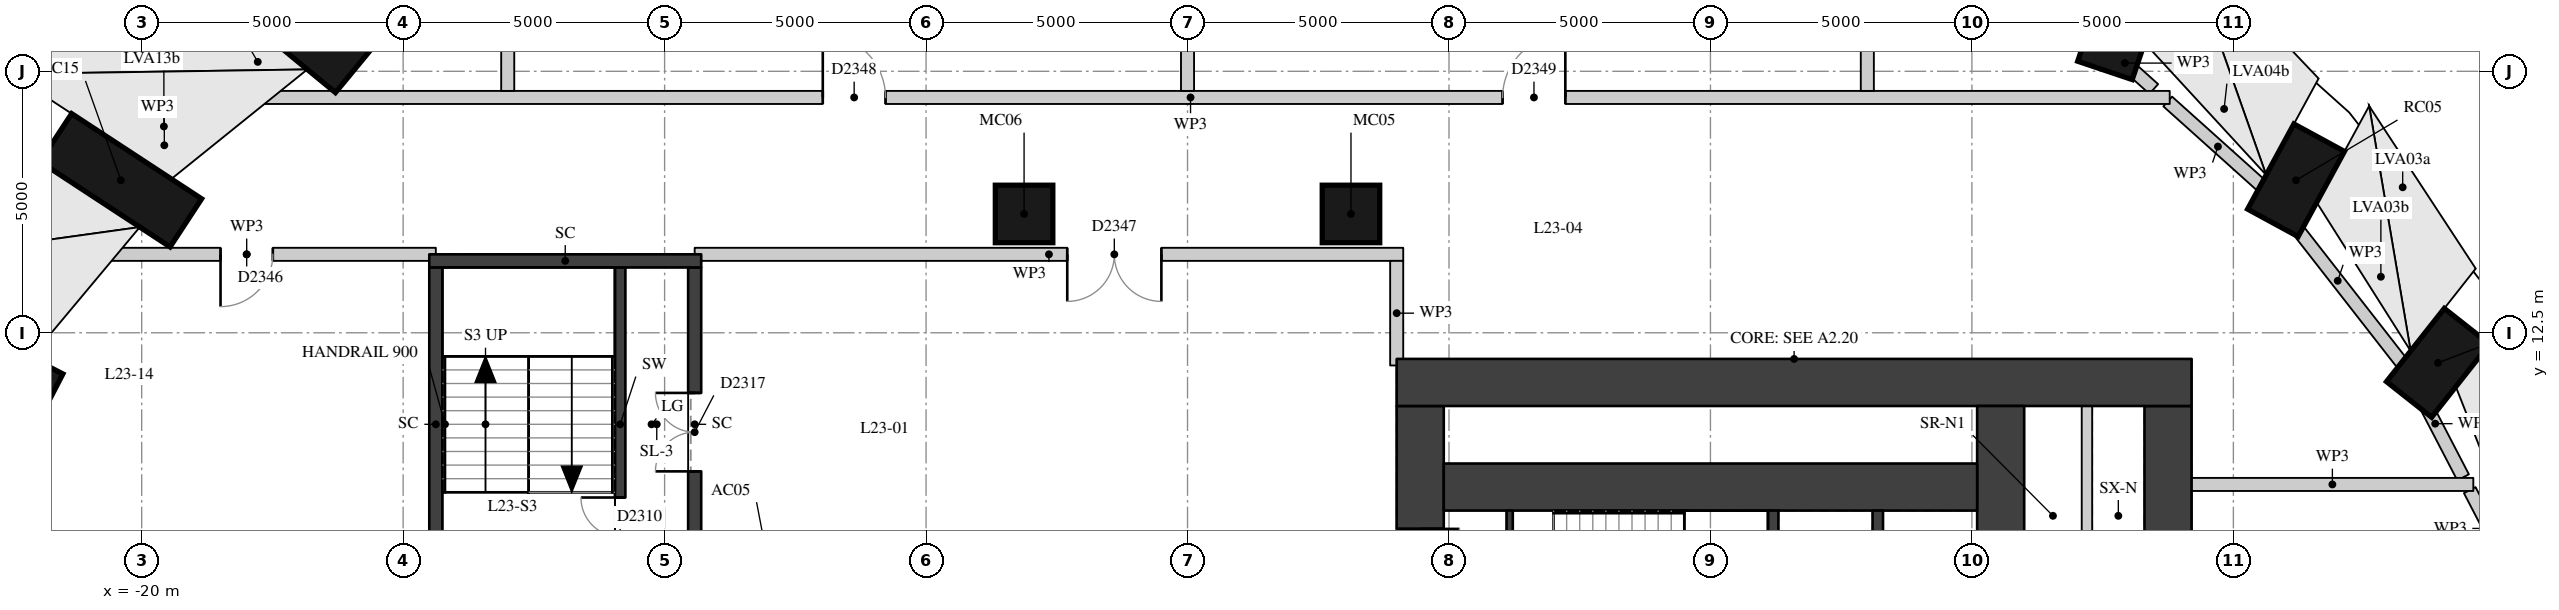
"""IFC4 building model, lengths in metres.
Left out: names, types, materials, properties, quantities, classifications, styles, units other than length and angle.
Written with IfcOpenShell. Run it as: python <this file> out.ifc"""

import sys

from ifc_helpers import new_model, si_unit, direction, frame, frame_2d, origin, origin_2d, place, context, subcontext, project, spatial, rectangle, extrude, element, fill, save


model = new_model("IFC4")
c1 = context("Model", 3, precision=1e-05, world=origin(), true_north=direction((0.0, 1.0)))
c2 = subcontext(c1, "Body", "Model", "MODEL_VIEW")
j1 = project(units=[si_unit("LENGTHUNIT", "METRE"), si_unit("PLANEANGLEUNIT", "RADIAN")], contexts=[c1])
p1 = place(None, origin())
s1 = spatial("IfcSite", under=j1, at=p1, CompositionType="ELEMENT")
p2 = place(p1, origin())
s2 = spatial("IfcBuilding", under=s1, at=p2, CompositionType="ELEMENT")
p3 = place(p2, frame((0.0, 0.0, 84.4)))
s3 = spatial("IfcBuildingStorey", under=s2, at=p3, CompositionType="ELEMENT", Elevation=84.4)
p4 = place(p3, frame((26.546, 8.636, 0.301), z_axis=(-0.297784822082, -0.269560947595, 0.91578441528), x_axis=(0.67893196225, 0.614583180623, 0.401670144186)))
e1 = element("IfcColumn", 1, at=p4, inside=s3, PredefinedType="COLUMN", context=c2, shape_type="SweptSolid", body=[
    extrude(rectangle(XDim=1.5, YDim=1.1, at=origin_2d()), origin(), (0.0, 0.0, 1.0), 4.256),
])
p5 = place(p3, frame((24.465, 12.625, 0.314), z_axis=(-0.259292563916, -0.328353260047, 0.90826840907), x_axis=(0.562892002032, 0.712814209288, 0.418387974356)))
e2 = element("IfcColumn", 2, at=p5, inside=s3, PredefinedType="COLUMN", context=c2, shape_type="SweptSolid", body=[
    extrude(rectangle(XDim=1.5, YDim=1.1, at=origin_2d()), origin(), (0.0, 0.0, 1.0), 4.263),
])
p6 = place(p3, frame((21.641, 16.23, 0.325), z_axis=(-0.207259742334, -0.381147637542, 0.900982728804), x_axis=(0.430414464234, 0.79152591024, 0.433854955482)))
e3 = element("IfcColumn", 3, at=p6, inside=s3, PredefinedType="COLUMN", context=c2, shape_type="SweptSolid", body=[
    extrude(rectangle(XDim=1.5, YDim=1.1, at=origin_2d()), origin(), (0.0, 0.0, 1.0), 4.272),
])
p7 = place(p3, frame((18.159, 19.343, 0.337), z_axis=(-0.143360529219, -0.426262440358, 0.893167448244), x_axis=(0.28471881473, 0.846571489681, 0.449724259294)))
e4 = element("IfcColumn", 4, at=p7, inside=s3, PredefinedType="COLUMN", context=c2, shape_type="SweptSolid", body=[
    extrude(rectangle(XDim=1.5, YDim=1.1, at=origin_2d()), origin(), (0.0, 0.0, 1.0), 4.283),
])
p8 = place(p3, frame((-18.159, 19.343, 0.471), z_axis=(0.48434493808, -0.399374952802, 0.778401970726), x_axis=(-0.600566052476, 0.49520707249, 0.627766176191)))
e5 = element("IfcColumn", 5, at=p8, inside=s3, PredefinedType="COLUMN", context=c2, shape_type="SweptSolid", body=[
    extrude(rectangle(XDim=1.5, YDim=1.1, at=origin_2d()), origin(), (0.0, 0.0, 1.0), 4.571),
])
p9 = place(p3, frame((-21.641, 16.23, 0.483), z_axis=(0.538208092319, -0.352637325714, 0.765492629537), x_axis=(-0.640294887233, 0.419525235545, 0.64344466283)))
e6 = element("IfcColumn", 6, at=p9, inside=s3, PredefinedType="COLUMN", context=c2, shape_type="SweptSolid", body=[
    extrude(rectangle(XDim=1.5, YDim=1.1, at=origin_2d()), origin(), (0.0, 0.0, 1.0), 4.618),
])
p10 = place(p3, frame((-24.465, 12.625, 0.491), z_axis=(0.581326092093, -0.300814349974, 0.75602295038), x_axis=(-0.671452374876, 0.347451305617, 0.65454510807)))
e7 = element("IfcColumn", 7, at=p10, inside=s3, PredefinedType="COLUMN", context=c2, shape_type="SweptSolid", body=[
    extrude(rectangle(XDim=1.5, YDim=1.1, at=origin_2d()), origin(), (0.0, 0.0, 1.0), 4.654),
])
for number, where, z_axis, x_axis in (
    (8, (3.126, 14.772, 0.0), (0.0, 0.0, 1.0), (1.0, 0.0, 0.0)),
    (9, (-3.126, 14.772, 0.0), (0.0, 0.0, 1.0), (1.0, 0.0, 0.0)),
):
    element("IfcColumn", number, at=place(p3, frame(where, z_axis=z_axis, x_axis=x_axis)), inside=s3, PredefinedType="COLUMN", context=c2, shape_type="SweptSolid", body=[
        extrude(rectangle(XDim=1.1, YDim=1.1, at=origin_2d()), origin(), (0.0, 0.0, 1.0), 4.5),
    ])
p11 = place(p3, frame((4.45, -11.1, 0.0), z_axis=(0.0, 0.0, 1.0), x_axis=(0.0, 1.0, 0.0)))
e10 = element("IfcWall", 10, at=p11, inside=s3, PredefinedType="SHEAR", context=c2, shape_type="SweptSolid", body=[
    extrude(rectangle(XDim=22.2, YDim=0.9, at=frame_2d((11.1, 0.0))), origin(), (0.0, 0.0, 1.0), 4.22),
])
p12 = place(p11, frame((2.35, 0.0, 0.0)))
e11 = element("IfcOpeningElement", 11, at=p12, cuts=e10, PredefinedType="OPENING", context=c2, shape_type="SweptSolid", body=[
    extrude(rectangle(XDim=1.5, YDim=2.1, at=frame_2d((0.75, 1.05))), frame((0.0, 0.46, 0.0), z_axis=(0.0, -1.0, 0.0), x_axis=(1.0, 0.0, 0.0)), (0.0, 0.0, 1.0), 0.92),
])
p13 = place(p11, frame((5.45, 0.0, 0.0)))
e12 = element("IfcOpeningElement", 12, at=p13, cuts=e10, PredefinedType="OPENING", context=c2, shape_type="SweptSolid", body=[
    extrude(rectangle(XDim=1.8, YDim=2.1, at=frame_2d((0.9, 1.05))), frame((0.0, 0.46, 0.0), z_axis=(0.0, -1.0, 0.0), x_axis=(1.0, 0.0, 0.0)), (0.0, 0.0, 1.0), 0.92),
])
p14 = place(p11, frame((7.95, 0.0, 0.0)))
e13 = element("IfcOpeningElement", 13, at=p14, cuts=e10, PredefinedType="OPENING", context=c2, shape_type="SweptSolid", body=[
    extrude(rectangle(XDim=1.1, YDim=2.1, at=frame_2d((0.55, 1.05))), frame((0.0, 0.46, 0.0), z_axis=(0.0, -1.0, 0.0), x_axis=(1.0, 0.0, 0.0)), (0.0, 0.0, 1.0), 0.92),
])
p15 = place(p11, frame((10.6, 0.0, 0.0)))
e14 = element("IfcOpeningElement", 14, at=p15, cuts=e10, PredefinedType="OPENING", context=c2, shape_type="SweptSolid", body=[
    extrude(rectangle(XDim=1.0, YDim=2.1, at=frame_2d((0.5, 1.05))), frame((0.0, 0.46, 0.0), z_axis=(0.0, -1.0, 0.0), x_axis=(1.0, 0.0, 0.0)), (0.0, 0.0, 1.0), 0.92),
])
p16 = place(p11, frame((13.15, 0.0, 0.0)))
e15 = element("IfcOpeningElement", 15, at=p16, cuts=e10, PredefinedType="OPENING", context=c2, shape_type="SweptSolid", body=[
    extrude(rectangle(XDim=1.1, YDim=2.1, at=frame_2d((0.55, 1.05))), frame((0.0, 0.46, 0.0), z_axis=(0.0, -1.0, 0.0), x_axis=(1.0, 0.0, 0.0)), (0.0, 0.0, 1.0), 0.92),
])
p17 = place(p11, frame((14.95, 0.0, 0.0)))
e16 = element("IfcOpeningElement", 16, at=p17, cuts=e10, PredefinedType="OPENING", context=c2, shape_type="SweptSolid", body=[
    extrude(rectangle(XDim=1.8, YDim=2.1, at=frame_2d((0.9, 1.05))), frame((0.0, 0.46, 0.0), z_axis=(0.0, -1.0, 0.0), x_axis=(1.0, 0.0, 0.0)), (0.0, 0.0, 1.0), 0.92),
])
p18 = place(p11, frame((18.35, 0.0, 0.0)))
e17 = element("IfcOpeningElement", 17, at=p18, cuts=e10, PredefinedType="OPENING", context=c2, shape_type="SweptSolid", body=[
    extrude(rectangle(XDim=1.5, YDim=2.1, at=frame_2d((0.75, 1.05))), frame((0.0, 0.46, 0.0), z_axis=(0.0, -1.0, 0.0), x_axis=(1.0, 0.0, 0.0)), (0.0, 0.0, 1.0), 0.92),
])
p19 = place(p3, frame((18.75, -11.1, 0.0), z_axis=(0.0, 0.0, 1.0), x_axis=(0.0, 1.0, 0.0)))
e18 = element("IfcWall", 18, at=p19, inside=s3, PredefinedType="SHEAR", context=c2, shape_type="SweptSolid", body=[
    extrude(rectangle(XDim=22.2, YDim=0.9, at=frame_2d((11.1, 0.0))), origin(), (0.0, 0.0, 1.0), 4.22),
])
p20 = place(p3, frame((4.0, 11.55, 0.0), z_axis=(0.0, 0.0, 1.0), x_axis=(1.0, 0.0, 0.0)))
e19 = element("IfcWall", 19, at=p20, inside=s3, PredefinedType="SHEAR", context=c2, shape_type="SweptSolid", body=[
    extrude(rectangle(XDim=15.2, YDim=0.9, at=frame_2d((7.6, 0.0))), origin(), (0.0, 0.0, 1.0), 4.22),
])
p21 = place(p3, frame((15.55, -11.1, 0.0), z_axis=(0.0, 0.0, 1.0), x_axis=(0.0, 1.0, 0.0)))
e20 = element("IfcWall", 20, at=p21, inside=s3, PredefinedType="SHEAR", context=c2, shape_type="SweptSolid", body=[
    extrude(rectangle(XDim=22.2, YDim=0.9, at=frame_2d((11.1, 0.0))), origin(), (0.0, 0.0, 1.0), 4.22),
])
p22 = place(p21, frame((15.6, 0.0, 0.0)))
e21 = element("IfcOpeningElement", 21, at=p22, cuts=e20, PredefinedType="OPENING", context=c2, shape_type="SweptSolid", body=[
    extrude(rectangle(XDim=1.0, YDim=2.1, at=frame_2d((0.5, 1.05))), frame((0.0, 0.46, 0.0), z_axis=(0.0, -1.0, 0.0), x_axis=(1.0, 0.0, 0.0)), (0.0, 0.0, 1.0), 0.92),
])
p23 = place(p21, frame((5.6, 0.0, 0.0)))
e22 = element("IfcOpeningElement", 22, at=p23, cuts=e20, PredefinedType="OPENING", context=c2, shape_type="SweptSolid", body=[
    extrude(rectangle(XDim=1.0, YDim=2.1, at=frame_2d((0.5, 1.05))), frame((0.0, 0.46, 0.0), z_axis=(0.0, -1.0, 0.0), x_axis=(1.0, 0.0, 0.0)), (0.0, 0.0, 1.0), 0.92),
])
p24 = place(p3, frame((4.9, 9.55, 0.0), z_axis=(0.0, 0.0, 1.0), x_axis=(1.0, 0.0, 0.0)))
e23 = element("IfcWall", 23, at=p24, inside=s3, PredefinedType="SHEAR", context=c2, shape_type="SweptSolid", body=[
    extrude(rectangle(XDim=10.2, YDim=0.9, at=frame_2d((5.1, 0.0))), origin(), (0.0, 0.0, 1.0), 4.22),
])
for number, where, z_axis, x_axis in (
    (24, (11.2, 5.9, 0.0), (0.0, 0.0, 1.0), (0.0, 1.0, 0.0)),
    (25, (13.2, 5.9, 0.0), (0.0, 0.0, 1.0), (0.0, 1.0, 0.0)),
):
    element("IfcWall", number, at=place(p3, frame(where, z_axis=z_axis, x_axis=x_axis)), inside=s3, PredefinedType="SHEAR", context=c2, shape_type="SweptSolid", body=[
        extrude(rectangle(XDim=3.2, YDim=0.2, at=frame_2d((1.6, 0.0))), origin(), (0.0, 0.0, 1.0), 4.22),
    ])
p25 = place(p3, frame((6.16, 5.9, 0.0), z_axis=(0.0, 0.0, 1.0), x_axis=(0.0, 1.0, 0.0)))
e26 = element("IfcWall", 26, at=p25, inside=s3, PredefinedType="SHEAR", context=c2, shape_type="SweptSolid", body=[
    extrude(rectangle(XDim=3.2, YDim=0.12, at=frame_2d((1.6, 0.0))), origin(), (0.0, 0.0, 1.0), 4.22),
])
p26 = place(p25, frame((0.85, 0.0, 0.0)))
e27 = element("IfcOpeningElement", 27, at=p26, cuts=e26, PredefinedType="OPENING", context=c2, shape_type="SweptSolid", body=[
    extrude(rectangle(XDim=1.5, YDim=2.1, at=frame_2d((0.75, 1.05))), frame((0.0, 0.07, 0.0), z_axis=(0.0, -1.0, 0.0), x_axis=(1.0, 0.0, 0.0)), (0.0, 0.0, 1.0), 0.14),
])
p27 = place(p3, frame((-10.85, 7.75, 0.0), z_axis=(0.0, 0.0, 1.0), x_axis=(0.0, 1.0, 0.0)))
e28 = element("IfcWall", 28, at=p27, inside=s3, PredefinedType="SHEAR", context=c2, shape_type="SweptSolid", body=[
    extrude(rectangle(XDim=6.0, YDim=0.2, at=frame_2d((3.0, 0.0))), origin(), (0.0, 0.0, 1.0), 4.22),
])
p28 = place(p27, frame((0.1, 0.0, 0.0)))
e29 = element("IfcOpeningElement", 29, at=p28, cuts=e28, PredefinedType="OPENING", context=c2, shape_type="SweptSolid", body=[
    extrude(rectangle(XDim=1.5, YDim=2.1, at=frame_2d((0.75, 1.05))), frame((0.0, 0.11, 0.0), z_axis=(0.0, -1.0, 0.0), x_axis=(1.0, 0.0, 0.0)), (0.0, 0.0, 1.0), 0.22),
])
p29 = place(p3, frame((17.2, 6.9, 0.0), z_axis=(0.0, 0.0, 1.0), x_axis=(0.0, 1.0, 0.0)))
e30 = element("IfcWall", 30, at=p29, inside=s3, PredefinedType="PARTITIONING", context=c2, shape_type="SweptSolid", body=[
    extrude(rectangle(XDim=4.2, YDim=0.2, at=frame_2d((2.1, 0.0))), origin(), (0.0, 0.0, 1.0), 4.22),
])
p30 = place(p3, frame((-14.375, 7.75, -0.45), z_axis=(0.0, 0.0, 1.0), x_axis=(0.0, 1.0, 0.0)))
e31 = element("IfcWall", 31, at=p30, inside=s3, PredefinedType="SHEAR", context=c2, shape_type="SweptSolid", body=[
    extrude(rectangle(XDim=6.0, YDim=0.25, at=frame_2d((3.0, 0.0))), origin(), (0.0, 0.0, 1.0), 4.67),
])
p31 = place(p3, frame((-9.425, 7.75, -0.45), z_axis=(0.0, 0.0, 1.0), x_axis=(0.0, 1.0, 0.0)))
e32 = element("IfcWall", 32, at=p31, inside=s3, PredefinedType="SHEAR", context=c2, shape_type="SweptSolid", body=[
    extrude(rectangle(XDim=6.0, YDim=0.25, at=frame_2d((3.0, 0.0))), origin(), (0.0, 0.0, 1.0), 4.67),
])
p32 = place(p31, frame((2.1, 0.0, 0.45)))
e33 = element("IfcOpeningElement", 33, at=p32, cuts=e32, PredefinedType="OPENING", context=c2, shape_type="SweptSolid", body=[
    extrude(rectangle(XDim=1.5, YDim=2.1, at=frame_2d((0.75, 1.05))), frame((0.0, 0.135, 0.0), z_axis=(0.0, -1.0, 0.0), x_axis=(1.0, 0.0, 0.0)), (0.0, 0.0, 1.0), 0.27),
])
p33 = place(p3, frame((-14.5, 13.875, -0.45), z_axis=(0.0, 0.0, 1.0), x_axis=(1.0, 0.0, 0.0)))
e34 = element("IfcWall", 34, at=p33, inside=s3, PredefinedType="SHEAR", context=c2, shape_type="SweptSolid", body=[
    extrude(rectangle(XDim=5.2, YDim=0.25, at=frame_2d((2.6, 0.0))), origin(), (0.0, 0.0, 1.0), 4.67),
])
p34 = place(p3, frame((-18.629, 16.923, 0.0), z_axis=(0.0, 0.0, 1.0), x_axis=(-0.745977283695, -0.665971389934, 0.0)))
e35 = element("IfcWall", 35, at=p34, inside=s3, PredefinedType="PARTITIONING", context=c2, shape_type="SweptSolid", body=[
    extrude(rectangle(XDim=2.514, YDim=0.25, at=frame_2d((1.257, 0.0))), origin(), (0.0, 0.0, 1.0), 4.22),
])
p35 = place(p3, frame((20.665, 15.199, 0.0), z_axis=(0.0, 0.0, 1.0), x_axis=(-0.744342369602, 0.667798200668, 0.0)))
e36 = element("IfcWall", 36, at=p35, inside=s3, PredefinedType="PARTITIONING", context=c2, shape_type="SweptSolid", body=[
    extrude(rectangle(XDim=2.58, YDim=0.25, at=frame_2d((1.29, 0.0))), origin(), (0.0, 0.0, 1.0), 4.22),
])
p36 = place(p3, frame((23.326, 11.789, 0.0), z_axis=(0.0, 0.0, 1.0), x_axis=(-0.615213541068, 0.788360513272, 0.0)))
e37 = element("IfcWall", 37, at=p36, inside=s3, PredefinedType="PARTITIONING", context=c2, shape_type="SweptSolid", body=[
    extrude(rectangle(XDim=4.326, YDim=0.25, at=frame_2d((2.163, 0.0))), origin(), (0.0, 0.0, 1.0), 4.22),
])
p37 = place(p3, frame((24.393, 9.735, 0.0), z_axis=(0.0, 0.0, 1.0), x_axis=(-0.46104377647, 0.887377392195, 0.0)))
e38 = element("IfcWall", 38, at=p37, inside=s3, PredefinedType="PARTITIONING", context=c2, shape_type="SweptSolid", body=[
    extrude(rectangle(XDim=2.314, YDim=0.25, at=frame_2d((1.157, 0.0))), origin(), (0.0, 0.0, 1.0), 4.22),
])
p38 = place(p3, frame((-17.199, 18.198, 0.0), z_axis=(0.0, 0.0, 1.0), x_axis=(-0.746040610703, -0.665900448402, 0.0)))
e39 = element("IfcWall", 39, at=p38, inside=s3, PredefinedType="PARTITIONING", context=c2, shape_type="SweptSolid", body=[
    extrude(rectangle(XDim=1.557, YDim=0.25, at=frame_2d((0.778, 0.0))), origin(), (0.0, 0.0, 1.0), 4.22),
])
p39 = place(p3, frame((18.478, 17.161, 0.0), z_axis=(0.0, 0.0, 1.0), x_axis=(-0.744315658598, 0.667827972135, 0.0)))
e40 = element("IfcWall", 40, at=p39, inside=s3, PredefinedType="PARTITIONING", context=c2, shape_type="SweptSolid", body=[
    extrude(rectangle(XDim=1.484, YDim=0.25, at=frame_2d((0.742, 0.0))), origin(), (0.0, 0.0, 1.0), 4.22),
])
p40 = place(p3, frame((25.281, 8.027, 0.0), z_axis=(0.0, 0.0, 1.0), x_axis=(-0.461007985197, 0.88739598691, 0.0)))
e41 = element("IfcWall", 41, at=p40, inside=s3, PredefinedType="PARTITIONING", context=c2, shape_type="SweptSolid", body=[
    extrude(rectangle(XDim=1.65, YDim=0.25, at=frame_2d((0.825, 0.0))), origin(), (0.0, 0.0, 1.0), 4.22),
])
p41 = place(p3, frame((19.198, 9.6, 0.0), z_axis=(0.0, 0.0, 1.0), x_axis=(1.0, 0.0, 0.0)))
e42 = element("IfcWall", 42, at=p41, inside=s3, PredefinedType="PARTITIONING", context=c2, shape_type="SweptSolid", body=[
    extrude(rectangle(XDim=5.391, YDim=0.25, at=frame_2d((2.695, 0.0))), origin(), (0.0, 0.0, 1.0), 4.22),
])
p42 = place(p3, frame((-21.609, 14.0, 0.0), z_axis=(0.0, 0.0, 1.0), x_axis=(1.0, 0.0, 0.0)))
e43 = element("IfcWall", 43, at=p42, inside=s3, PredefinedType="PARTITIONING", context=c2, shape_type="SweptSolid", body=[
    extrude(rectangle(XDim=7.234, YDim=0.25, at=frame_2d((3.617, 0.0))), origin(), (0.0, 0.0, 1.0), 4.22),
])
p43 = place(p42, frame((3.117, 0.0, 0.0)))
e44 = element("IfcOpeningElement", 44, at=p43, cuts=e43, PredefinedType="OPENING", context=c2, shape_type="SweptSolid", body=[
    extrude(rectangle(XDim=1.0, YDim=2.1, at=frame_2d((0.5, 1.05))), frame((0.0, 0.135, 0.0), z_axis=(0.0, -1.0, 0.0), x_axis=(1.0, 0.0, 0.0)), (0.0, 0.0, 1.0), 0.27),
])
p44 = place(p3, frame((-9.425, 14.0, 0.0), z_axis=(0.0, 0.0, 1.0), x_axis=(1.0, 0.0, 0.0)))
e45 = element("IfcWall", 45, at=p44, inside=s3, PredefinedType="PARTITIONING", context=c2, shape_type="SweptSolid", body=[
    extrude(rectangle(XDim=13.55, YDim=0.25, at=frame_2d((6.775, 0.0))), origin(), (0.0, 0.0, 1.0), 4.22),
])
p45 = place(p44, frame((7.125, 0.0, 0.0)))
e46 = element("IfcOpeningElement", 46, at=p45, cuts=e45, PredefinedType="OPENING", context=c2, shape_type="SweptSolid", body=[
    extrude(rectangle(XDim=1.8, YDim=2.1, at=frame_2d((0.9, 1.05))), frame((0.0, 0.135, 0.0), z_axis=(0.0, -1.0, 0.0), x_axis=(1.0, 0.0, 0.0)), (0.0, 0.0, 1.0), 0.27),
])
p46 = place(p3, frame((-18.667, 17.0, 0.0), z_axis=(0.0, 0.0, 1.0), x_axis=(1.0, 0.0, 0.0)))
e47 = element("IfcWall", 47, at=p46, inside=s3, PredefinedType="PARTITIONING", context=c2, shape_type="SweptSolid", body=[
    extrude(rectangle(XDim=37.45, YDim=0.25, at=frame_2d((18.725, 0.0))), origin(), (0.0, 0.0, 1.0), 4.22),
])
p47 = place(p46, frame((11.692, 0.0, 0.0)))
e48 = element("IfcOpeningElement", 48, at=p47, cuts=e47, PredefinedType="OPENING", context=c2, shape_type="SweptSolid", body=[
    extrude(rectangle(XDim=1.2, YDim=2.1, at=frame_2d((0.6, 1.05))), frame((0.0, 0.135, 0.0), z_axis=(0.0, -1.0, 0.0), x_axis=(1.0, 0.0, 0.0)), (0.0, 0.0, 1.0), 0.27),
])
p48 = place(p46, frame((24.692, 0.0, 0.0)))
e49 = element("IfcOpeningElement", 49, at=p48, cuts=e47, PredefinedType="OPENING", context=c2, shape_type="SweptSolid", body=[
    extrude(rectangle(XDim=1.2, YDim=2.1, at=frame_2d((0.6, 1.05))), frame((0.0, 0.135, 0.0), z_axis=(0.0, -1.0, 0.0), x_axis=(1.0, 0.0, 0.0)), (0.0, 0.0, 1.0), 0.27),
])
p49 = place(p3, frame((-13.0, 17.125, 0.0), z_axis=(0.0, 0.0, 1.0), x_axis=(0.0, 1.0, 0.0)))
e50 = element("IfcWall", 50, at=p49, inside=s3, PredefinedType="PARTITIONING", context=c2, shape_type="SweptSolid", body=[
    extrude(rectangle(XDim=3.745, YDim=0.25, at=frame_2d((1.873, 0.0))), origin(), (0.0, 0.0, 1.0), 3.77),
])
p50 = place(p3, frame((0.0, 17.125, 0.0), z_axis=(0.0, 0.0, 1.0), x_axis=(0.0, 1.0, 0.0)))
e51 = element("IfcWall", 51, at=p50, inside=s3, PredefinedType="PARTITIONING", context=c2, shape_type="SweptSolid", body=[
    extrude(rectangle(XDim=6.792, YDim=0.25, at=frame_2d((3.396, 0.0))), origin(), (0.0, 0.0, 1.0), 3.77),
])
p51 = place(p3, frame((4.0, 11.875, 0.0), z_axis=(0.0, 0.0, 1.0), x_axis=(0.0, 1.0, 0.0)))
e52 = element("IfcWall", 52, at=p51, inside=s3, PredefinedType="PARTITIONING", context=c2, shape_type="SweptSolid", body=[
    extrude(rectangle(XDim=2.0, YDim=0.25, at=frame_2d((1.0, 0.0))), origin(), (0.0, 0.0, 1.0), 4.22),
])
p52 = place(p3, frame((13.0, 17.125, 0.0), z_axis=(0.0, 0.0, 1.0), x_axis=(0.0, 1.0, 0.0)))
e53 = element("IfcWall", 53, at=p52, inside=s3, PredefinedType="PARTITIONING", context=c2, shape_type="SweptSolid", body=[
    extrude(rectangle(XDim=3.787, YDim=0.25, at=frame_2d((1.893, 0.0))), origin(), (0.0, 0.0, 1.0), 4.22),
])
p53 = place(p18, origin())
e54 = element("IfcDoor", 54, at=p53, inside=s3, OperationType="DOUBLE_DOOR_SINGLE_SWING", PredefinedType="DOOR", context=c2, shape_type="SweptSolid", body=[
    extrude(rectangle(XDim=1.5, YDim=2.1, at=frame_2d((0.75, 1.05))), frame((0.0, 0.025, 0.0), z_axis=(0.0, -1.0, 0.0), x_axis=(1.0, 0.0, 0.0)), (0.0, 0.0, 1.0), 0.05),
])
fill(e17, e54)
p54 = place(p28, origin())
e55 = element("IfcDoor", 55, at=p54, inside=s3, OperationType="DOUBLE_DOOR_SINGLE_SWING", PredefinedType="DOOR", context=c2, shape_type="SweptSolid", body=[
    extrude(rectangle(XDim=1.5, YDim=2.1, at=frame_2d((0.75, 1.05))), frame((0.0, 0.025, 0.0), z_axis=(0.0, -1.0, 0.0), x_axis=(1.0, 0.0, 0.0)), (0.0, 0.0, 1.0), 0.05),
])
fill(e29, e55)
p55 = place(p32, origin())
e56 = element("IfcDoor", 56, at=p55, inside=s3, OperationType="DOUBLE_DOOR_SINGLE_SWING", PredefinedType="DOOR", context=c2, shape_type="SweptSolid", body=[
    extrude(rectangle(XDim=1.5, YDim=2.1, at=frame_2d((0.75, 1.05))), frame((0.0, 0.025, 0.0), z_axis=(0.0, -1.0, 0.0), x_axis=(1.0, 0.0, 0.0)), (0.0, 0.0, 1.0), 0.05),
])
fill(e33, e56)
p56 = place(p47, origin())
e57 = element("IfcDoor", 57, at=p56, inside=s3, OperationType="SINGLE_SWING_LEFT", PredefinedType="DOOR", context=c2, shape_type="SweptSolid", body=[
    extrude(rectangle(XDim=1.2, YDim=2.1, at=frame_2d((0.6, 1.05))), frame((0.0, 0.025, 0.0), z_axis=(0.0, -1.0, 0.0), x_axis=(1.0, 0.0, 0.0)), (0.0, 0.0, 1.0), 0.05),
])
fill(e48, e57)
p57 = place(p48, origin())
e58 = element("IfcDoor", 58, at=p57, inside=s3, OperationType="SINGLE_SWING_RIGHT", PredefinedType="DOOR", context=c2, shape_type="SweptSolid", body=[
    extrude(rectangle(XDim=1.2, YDim=2.1, at=frame_2d((0.6, 1.05))), frame((0.0, 0.025, 0.0), z_axis=(0.0, -1.0, 0.0), x_axis=(1.0, 0.0, 0.0)), (0.0, 0.0, 1.0), 0.05),
])
fill(e49, e58)
p58 = place(p45, origin())
e59 = element("IfcDoor", 59, at=p58, inside=s3, OperationType="DOUBLE_DOOR_SINGLE_SWING", PredefinedType="DOOR", context=c2, shape_type="SweptSolid", body=[
    extrude(rectangle(XDim=1.8, YDim=2.1, at=frame_2d((0.9, 1.05))), frame((0.0, 0.025, 0.0), z_axis=(0.0, -1.0, 0.0), x_axis=(1.0, 0.0, 0.0)), (0.0, 0.0, 1.0), 0.05),
])
fill(e46, e59)
p59 = place(p43, origin())
e60 = element("IfcDoor", 60, at=p59, inside=s3, OperationType="SINGLE_SWING_RIGHT", PredefinedType="DOOR", context=c2, shape_type="SweptSolid", body=[
    extrude(rectangle(XDim=1.0, YDim=2.1, at=frame_2d((0.5, 1.05))), frame((0.0, 0.025, 0.0), z_axis=(0.0, -1.0, 0.0), x_axis=(1.0, 0.0, 0.0)), (0.0, 0.0, 1.0), 0.05),
])
fill(e44, e60)
save(model, sys.argv[1])
